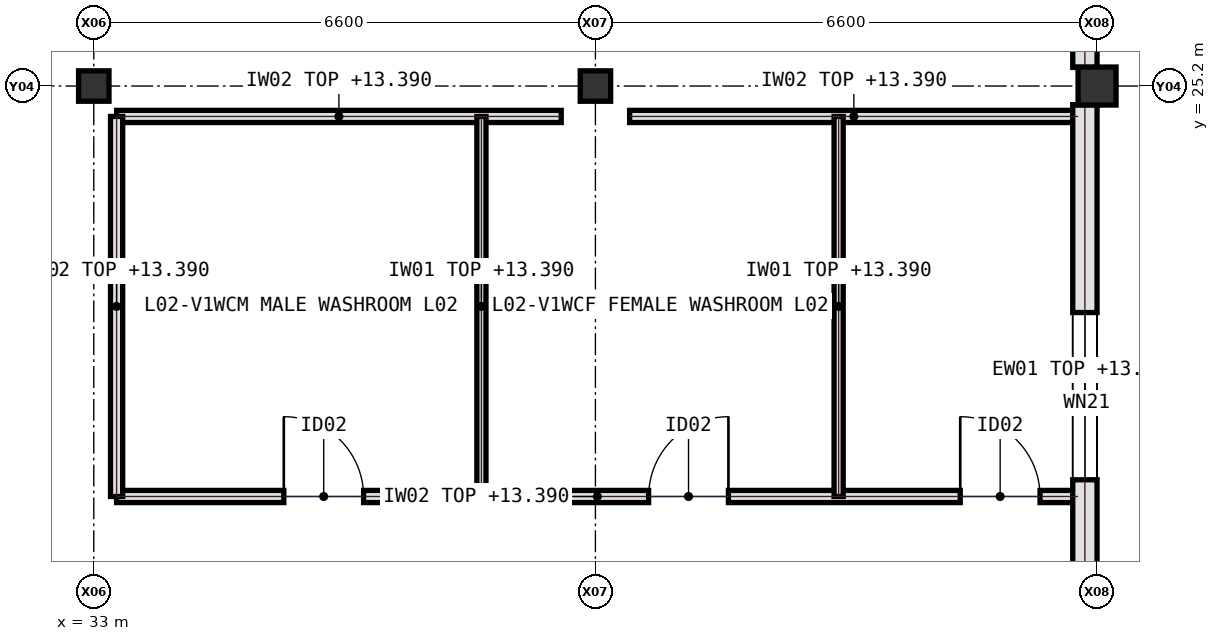
"""IFC4 building model, lengths in metres.
Left out: names, types, materials, properties, quantities, classifications, styles, units other than length and angle.
Written with IfcOpenShell. Run it as: python <this file> out.ifc"""

import sys

from ifc_helpers import new_model, si_unit, direction, frame, frame_2d, origin, origin_2d, place, context, subcontext, project, spatial, rectangle, extrude, element, fill, save


model = new_model("IFC4")
c1 = context("Model", 3, precision=1e-05, world=origin(), true_north=direction((0.0, 1.0)))
c2 = subcontext(c1, "Body", "Model", "MODEL_VIEW")
j1 = project(units=[si_unit("LENGTHUNIT", "METRE"), si_unit("PLANEANGLEUNIT", "RADIAN")], contexts=[c1])
p1 = place(None, origin())
s1 = spatial("IfcSite", under=j1, at=p1, CompositionType="ELEMENT")
p2 = place(p1, origin())
s2 = spatial("IfcBuilding", under=s1, at=p2, CompositionType="ELEMENT")
p3 = place(p2, frame((0.0, 0.0, 9.9)))
s3 = spatial("IfcBuildingStorey", under=s2, at=p3, CompositionType="ELEMENT", Elevation=9.9)
for number, where, z_axis, x_axis in (
    (1, (33.0, 25.2, 0.0), (0.0, 0.0, 1.0), (1.0, 0.0, 0.0)),
    (2, (39.6, 25.2, 0.0), (0.0, 0.0, 1.0), (1.0, 0.0, 0.0)),
):
    element("IfcColumn", number, at=place(p3, frame(where, z_axis=z_axis, x_axis=x_axis)), inside=s3, PredefinedType="COLUMN", context=c2, shape_type="SweptSolid", body=[
        extrude(rectangle(XDim=0.4, YDim=0.4, at=origin_2d()), origin(), (0.0, 0.0, 1.0), 4.5),
    ])
p4 = place(p3, frame((46.2, 25.2, 0.0), z_axis=(0.0, 0.0, 1.0), x_axis=(1.0, 0.0, 0.0)))
e3 = element("IfcColumn", 3, at=p4, inside=s3, PredefinedType="COLUMN", context=c2, shape_type="SweptSolid", body=[
    extrude(rectangle(XDim=0.5, YDim=0.5, at=origin_2d()), origin(), (0.0, 0.0, 1.0), 4.5),
])
p5 = place(p3, frame((33.3, 19.8, 0.0), z_axis=(0.0, 0.0, 1.0), x_axis=(1.0, 0.0, 0.0)))
e4 = element("IfcWall", 4, at=p5, inside=s3, PredefinedType="PARTITIONING", context=c2, shape_type="SweptSolid", body=[
    extrude(rectangle(XDim=12.65, YDim=0.16, at=frame_2d((6.325, 0.0))), origin(), (0.0, 0.0, 1.0), 3.49),
])
p6 = place(p5, frame((2.2, 0.0, 0.0)))
e5 = element("IfcOpeningElement", 5, at=p6, cuts=e4, PredefinedType="OPENING", context=c2, shape_type="SweptSolid", body=[
    extrude(rectangle(XDim=1.05, YDim=2.15, at=frame_2d((0.525, 1.075))), frame((0.0, 0.09, 0.0), z_axis=(0.0, -1.0, 0.0), x_axis=(1.0, 0.0, 0.0)), (0.0, 0.0, 1.0), 0.18),
])
p7 = place(p5, frame((7.0, 0.0, 0.0)))
e6 = element("IfcOpeningElement", 6, at=p7, cuts=e4, PredefinedType="OPENING", context=c2, shape_type="SweptSolid", body=[
    extrude(rectangle(XDim=1.05, YDim=2.15, at=frame_2d((0.525, 1.075))), frame((0.0, 0.09, 0.0), z_axis=(0.0, -1.0, 0.0), x_axis=(1.0, 0.0, 0.0)), (0.0, 0.0, 1.0), 0.18),
])
p8 = place(p5, frame((11.1, 0.0, 0.0)))
e7 = element("IfcOpeningElement", 7, at=p8, cuts=e4, PredefinedType="OPENING", context=c2, shape_type="SweptSolid", body=[
    extrude(rectangle(XDim=1.05, YDim=2.15, at=frame_2d((0.525, 1.075))), frame((0.0, 0.09, 0.0), z_axis=(0.0, -1.0, 0.0), x_axis=(1.0, 0.0, 0.0)), (0.0, 0.0, 1.0), 0.18),
])
p9 = place(p3, frame((33.3, 24.8, 0.0), z_axis=(0.0, 0.0, 1.0), x_axis=(1.0, 0.0, 0.0)))
e8 = element("IfcWall", 8, at=p9, inside=s3, PredefinedType="PARTITIONING", context=c2, shape_type="SweptSolid", body=[
    extrude(rectangle(XDim=5.85, YDim=0.16, at=frame_2d((2.925, 0.0))), origin(), (0.0, 0.0, 1.0), 3.49),
])
p10 = place(p3, frame((40.05, 24.8, 0.0), z_axis=(0.0, 0.0, 1.0), x_axis=(1.0, 0.0, 0.0)))
e9 = element("IfcWall", 9, at=p10, inside=s3, PredefinedType="PARTITIONING", context=c2, shape_type="SweptSolid", body=[
    extrude(rectangle(XDim=5.9, YDim=0.16, at=frame_2d((2.95, 0.0))), origin(), (0.0, 0.0, 1.0), 3.49),
])
p11 = place(p3, frame((33.3, 19.8, 0.0), z_axis=(0.0, 0.0, 1.0), x_axis=(0.0, 1.0, 0.0)))
e10 = element("IfcWall", 10, at=p11, inside=s3, PredefinedType="PARTITIONING", context=c2, shape_type="SweptSolid", body=[
    extrude(rectangle(XDim=5.0, YDim=0.16, at=frame_2d((2.5, 0.0))), origin(), (0.0, 0.0, 1.0), 3.49),
])
for number, where, z_axis, x_axis in (
    (11, (38.1, 19.8, 0.0), (0.0, 0.0, 1.0), (0.0, 1.0, 0.0)),
    (12, (42.8, 19.8, 0.0), (0.0, 0.0, 1.0), (0.0, 1.0, 0.0)),
):
    element("IfcWall", number, at=place(p3, frame(where, z_axis=z_axis, x_axis=x_axis)), inside=s3, PredefinedType="PARTITIONING", context=c2, shape_type="SweptSolid", body=[
        extrude(rectangle(XDim=5.0, YDim=0.12, at=frame_2d((2.5, 0.0))), origin(), (0.0, 0.0, 1.0), 3.49),
    ])
p12 = place(p3, frame((46.04, 17.045, 0.0), z_axis=(0.0, 0.0, 1.0), x_axis=(0.0, 1.0, 0.0)))
e13 = element("IfcWall", 13, at=p12, inside=s3, PredefinedType="SOLIDWALL", context=c2, shape_type="SweptSolid", body=[
    extrude(rectangle(XDim=7.91, YDim=0.32, at=frame_2d((3.955, 0.0))), origin(), (0.0, 0.0, 1.0), 3.625),
])
p13 = place(p12, frame((2.975, 0.0, 0.95)))
e14 = element("IfcOpeningElement", 14, at=p13, cuts=e13, PredefinedType="OPENING", context=c2, shape_type="SweptSolid", body=[
    extrude(rectangle(XDim=2.2, YDim=1.85, at=frame_2d((1.1, 0.925))), frame((0.0, 0.17, 0.0), z_axis=(0.0, -1.0, 0.0), x_axis=(1.0, 0.0, 0.0)), (0.0, 0.0, 1.0), 0.34),
])
p14 = place(p3, frame((46.04, 25.445, 0.0), z_axis=(0.0, 0.0, 1.0), x_axis=(0.0, 1.0, 0.0)))
e15 = element("IfcWall", 15, at=p14, inside=s3, PredefinedType="SOLIDWALL", context=c2, shape_type="SweptSolid", body=[
    extrude(rectangle(XDim=7.91, YDim=0.32, at=frame_2d((3.955, 0.0))), origin(), (0.0, 0.0, 1.0), 3.625),
])
p15 = place(p14, frame((2.655, 0.0, 0.95)))
e16 = element("IfcOpeningElement", 16, at=p15, cuts=e15, PredefinedType="OPENING", context=c2, shape_type="SweptSolid", body=[
    extrude(rectangle(XDim=2.6, YDim=1.9, at=frame_2d((1.3, 0.95))), frame((0.0, 0.17, 0.0), z_axis=(0.0, -1.0, 0.0), x_axis=(1.0, 0.0, 0.0)), (0.0, 0.0, 1.0), 0.34),
])
p16 = place(p6, origin())
e17 = element("IfcDoor", 17, at=p16, inside=s3, OperationType="SINGLE_SWING_LEFT", PredefinedType="DOOR", context=c2, shape_type="SweptSolid", body=[
    extrude(rectangle(XDim=1.05, YDim=2.15, at=frame_2d((0.525, 1.075))), frame((0.0, 0.025, 0.0), z_axis=(0.0, -1.0, 0.0), x_axis=(1.0, 0.0, 0.0)), (0.0, 0.0, 1.0), 0.05),
])
fill(e5, e17)
p17 = place(p7, origin())
e18 = element("IfcDoor", 18, at=p17, inside=s3, OperationType="SINGLE_SWING_RIGHT", PredefinedType="DOOR", context=c2, shape_type="SweptSolid", body=[
    extrude(rectangle(XDim=1.05, YDim=2.15, at=frame_2d((0.525, 1.075))), frame((0.0, 0.025, 0.0), z_axis=(0.0, -1.0, 0.0), x_axis=(1.0, 0.0, 0.0)), (0.0, 0.0, 1.0), 0.05),
])
fill(e6, e18)
p18 = place(p8, origin())
e19 = element("IfcDoor", 19, at=p18, inside=s3, OperationType="SINGLE_SWING_LEFT", PredefinedType="DOOR", context=c2, shape_type="SweptSolid", body=[
    extrude(rectangle(XDim=1.05, YDim=2.15, at=frame_2d((0.525, 1.075))), frame((0.0, 0.025, 0.0), z_axis=(0.0, -1.0, 0.0), x_axis=(1.0, 0.0, 0.0)), (0.0, 0.0, 1.0), 0.05),
])
fill(e7, e19)
p19 = place(p13, origin())
e20 = element("IfcWindow", 20, at=p19, inside=s3, PartitioningType="SINGLE_PANEL", PredefinedType="WINDOW", context=c2, shape_type="SweptSolid", body=[
    extrude(rectangle(XDim=2.2, YDim=1.85, at=frame_2d((1.1, 0.925))), frame((0.0, 0.03, 0.0), z_axis=(0.0, -1.0, 0.0), x_axis=(1.0, 0.0, 0.0)), (0.0, 0.0, 1.0), 0.06),
])
fill(e14, e20)
save(model, sys.argv[1])
